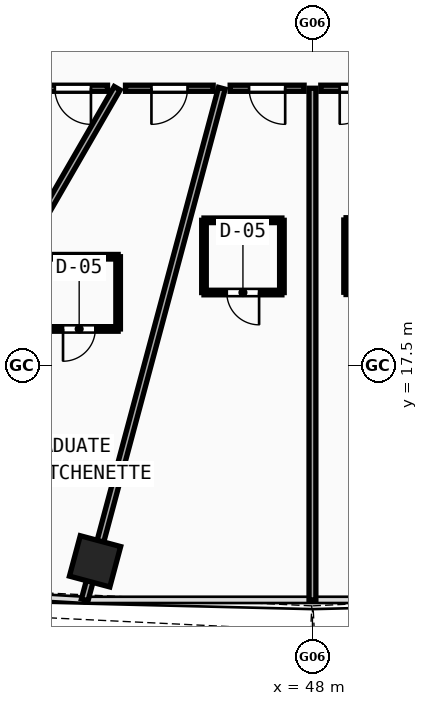
"""IFC4 building model, lengths in metres.
Left out: names, types, materials, properties, quantities, classifications, styles, units other than length and angle.
Written with IfcOpenShell. Run it as: python <this file> out.ifc"""

import sys

from ifc_helpers import new_model, si_unit, direction, frame, frame_2d, origin, origin_with_axes, origin_2d, place, context, subcontext, project, spatial, rectangle, hollow_rectangle, extrude, source, transform, mapped, element, fill, save


model = new_model("IFC4")
c1 = context("Model", 3, precision=1e-05, world=origin(), true_north=direction((0.0, 1.0)))
c2 = subcontext(c1, "Body", "Model", "MODEL_VIEW")
j1 = project(units=[si_unit("LENGTHUNIT", "METRE"), si_unit("PLANEANGLEUNIT", "RADIAN")], contexts=[c1])
p1 = place(None, origin())
s1 = spatial("IfcSite", under=j1, at=p1, CompositionType="ELEMENT")
p2 = place(p1, origin())
s2 = spatial("IfcBuilding", under=s1, at=p2, CompositionType="ELEMENT")
p3 = place(p2, frame((0.0, 0.0, 66.7)))
s3 = spatial("IfcBuildingStorey", under=s2, at=p3, CompositionType="ELEMENT", Elevation=66.7)
m1 = source(origin(), c2, "Body", "SweptSolid", [
    extrude(hollow_rectangle(XDim=1.1, YDim=1.1, WallThickness=0.045, at=origin_2d()), origin(), (0.0, 0.0, 1.0), 3.63),
])
p4 = place(p3, frame((42.28, 12.352, -0.26), z_axis=(0.0, 0.0, 1.0), x_axis=(0.965925826289, -0.258819045103, 0.0)))
e1 = element("IfcColumn", 1, at=p4, inside=s3, PredefinedType="COLUMN", context=c2, shape_type="MappedRepresentation", body=[
    mapped(m1, transform((0.0, 0.0, 0.0), scale=1.0)),
])
p5 = place(p3, frame((42.862, 24.8, 0.0), z_axis=(0.0, 0.0, 1.0), x_axis=(-0.499994448746, -0.866028608779, 0.0)))
e2 = element("IfcWall", 2, at=p5, inside=s3, PredefinedType="PARTITIONING", context=c2, shape_type="SweptSolid", body=[
    extrude(rectangle(XDim=15.099, YDim=0.18, at=frame_2d((7.55, 0.0))), origin(), (0.0, 0.0, 1.0), 2.67),
])
p6 = place(p3, frame((45.615, 24.8, 0.0), z_axis=(0.0, 0.0, 1.0), x_axis=(-0.258819267056, -0.965925766817, 0.0)))
e3 = element("IfcWall", 3, at=p6, inside=s3, PredefinedType="PARTITIONING", context=c2, shape_type="SweptSolid", body=[
    extrude(rectangle(XDim=13.937, YDim=0.18, at=frame_2d((6.969, 0.0))), origin(), (0.0, 0.0, 1.0), 2.67),
])
p7 = place(p3, frame((48.0, 24.8, 0.0), z_axis=(0.0, 0.0, 1.0), x_axis=(0.0, -1.0, 0.0)))
e4 = element("IfcWall", 4, at=p7, inside=s3, PredefinedType="PARTITIONING", context=c2, shape_type="SweptSolid", body=[
    extrude(rectangle(XDim=13.462, YDim=0.18, at=frame_2d((6.731, 0.0))), origin(), (0.0, 0.0, 1.0), 2.67),
])
p8 = place(p3, frame((50.165, 24.8, 0.0), z_axis=(0.0, 0.0, 1.0), x_axis=(-1.0, 0.0, 0.0)))
e5 = element("IfcWall", 5, at=p8, inside=s3, PredefinedType="PARTITIONING", context=c2, shape_type="SweptSolid", body=[
    extrude(rectangle(XDim=1.945, YDim=0.16, at=frame_2d((0.972, 0.0))), origin(), (0.0, 0.0, 1.0), 3.37),
])
p9 = place(p8, frame((0.498, 0.0, 0.0)))
e6 = element("IfcOpeningElement", 6, at=p9, cuts=e5, PredefinedType="OPENING", context=c2, shape_type="SweptSolid", body=[
    extrude(rectangle(XDim=0.95, YDim=2.1, at=frame_2d((0.475, 1.05))), frame((0.0, 0.09, 0.0), z_axis=(0.0, -1.0, 0.0), x_axis=(1.0, 0.0, 0.0)), (0.0, 0.0, 1.0), 0.18),
])
p10 = place(p3, frame((47.78, 24.8, 0.0), z_axis=(0.0, 0.0, 1.0), x_axis=(-1.0, 0.0, 0.0)))
e7 = element("IfcWall", 7, at=p10, inside=s3, PredefinedType="PARTITIONING", context=c2, shape_type="SweptSolid", body=[
    extrude(rectangle(XDim=1.945, YDim=0.16, at=frame_2d((0.972, 0.0))), origin(), (0.0, 0.0, 1.0), 3.37),
])
p11 = place(p10, frame((0.497, 0.0, 0.0)))
e8 = element("IfcOpeningElement", 8, at=p11, cuts=e7, PredefinedType="OPENING", context=c2, shape_type="SweptSolid", body=[
    extrude(rectangle(XDim=0.95, YDim=2.1, at=frame_2d((0.475, 1.05))), frame((0.0, 0.09, 0.0), z_axis=(0.0, -1.0, 0.0), x_axis=(1.0, 0.0, 0.0)), (0.0, 0.0, 1.0), 0.18),
])
p12 = place(p3, frame((45.387, 24.8, 0.0), z_axis=(0.0, 0.0, 1.0), x_axis=(-1.0, 0.0, 0.0)))
e9 = element("IfcWall", 9, at=p12, inside=s3, PredefinedType="PARTITIONING", context=c2, shape_type="SweptSolid", body=[
    extrude(rectangle(XDim=2.306, YDim=0.16, at=frame_2d((1.153, 0.0))), origin(), (0.0, 0.0, 1.0), 3.37),
])
p13 = place(p12, frame((0.674, 0.0, 0.0)))
e10 = element("IfcOpeningElement", 10, at=p13, cuts=e9, PredefinedType="OPENING", context=c2, shape_type="SweptSolid", body=[
    extrude(rectangle(XDim=0.95, YDim=2.1, at=frame_2d((0.475, 1.05))), frame((0.0, 0.09, 0.0), z_axis=(0.0, -1.0, 0.0), x_axis=(1.0, 0.0, 0.0)), (0.0, 0.0, 1.0), 0.18),
])
p14 = place(p3, frame((42.608, 24.8, 0.0), z_axis=(0.0, 0.0, 1.0), x_axis=(-1.0, 0.0, 0.0)))
e11 = element("IfcWall", 11, at=p14, inside=s3, PredefinedType="PARTITIONING", context=c2, shape_type="SweptSolid", body=[
    extrude(rectangle(XDim=1.856, YDim=0.16, at=frame_2d((0.928, 0.0))), origin(), (0.0, 0.0, 1.0), 2.67),
])
p15 = place(p14, frame((0.436, 0.0, 0.0)))
e12 = element("IfcOpeningElement", 12, at=p15, cuts=e11, PredefinedType="OPENING", context=c2, shape_type="SweptSolid", body=[
    extrude(rectangle(XDim=0.95, YDim=2.1, at=frame_2d((0.475, 1.05))), frame((0.0, 0.09, 0.0), z_axis=(0.0, -1.0, 0.0), x_axis=(1.0, 0.0, 0.0)), (0.0, 0.0, 1.0), 0.18),
])
p16 = place(p3, frame((40.837, 18.467, 0.0), z_axis=(0.0, 0.0, 1.0), x_axis=(1.0, 0.0, 0.0)))
e13 = element("IfcWall", 13, at=p16, inside=s3, PredefinedType="PARTITIONING", context=c2, shape_type="SweptSolid", body=[
    extrude(rectangle(XDim=2.05, YDim=0.12, at=frame_2d((1.025, 0.0))), origin(), (0.0, 0.0, 1.0), 3.37),
])
p17 = place(p16, frame((0.6, 0.0, 0.0)))
e14 = element("IfcOpeningElement", 14, at=p17, cuts=e13, PredefinedType="OPENING", context=c2, shape_type="SweptSolid", body=[
    extrude(rectangle(XDim=0.85, YDim=2.1, at=frame_2d((0.425, 1.05))), frame((0.0, 0.07, 0.0), z_axis=(0.0, -1.0, 0.0), x_axis=(1.0, 0.0, 0.0)), (0.0, 0.0, 1.0), 0.14),
])
p18 = place(p3, frame((42.887, 18.467, 0.0), z_axis=(0.0, 0.0, 1.0), x_axis=(0.0, 1.0, 0.0)))
e15 = element("IfcWall", 15, at=p18, inside=s3, PredefinedType="PARTITIONING", context=c2, shape_type="SweptSolid", body=[
    extrude(rectangle(XDim=1.9, YDim=0.12, at=frame_2d((0.95, 0.0))), origin(), (0.0, 0.0, 1.0), 3.37),
])
p19 = place(p3, frame((42.887, 20.367, 0.0), z_axis=(0.0, 0.0, 1.0), x_axis=(-1.0, 0.0, 0.0)))
e16 = element("IfcWall", 16, at=p19, inside=s3, PredefinedType="PARTITIONING", context=c2, shape_type="SweptSolid", body=[
    extrude(rectangle(XDim=2.05, YDim=0.12, at=frame_2d((1.025, 0.0))), origin(), (0.0, 0.0, 1.0), 3.37),
])
p20 = place(p3, frame((45.146, 19.425, 0.0), z_axis=(0.0, 0.0, 1.0), x_axis=(1.0, 0.0, 0.0)))
e17 = element("IfcWall", 17, at=p20, inside=s3, PredefinedType="PARTITIONING", context=c2, shape_type="SweptSolid", body=[
    extrude(rectangle(XDim=2.05, YDim=0.12, at=frame_2d((1.025, 0.0))), origin(), (0.0, 0.0, 1.0), 3.37),
])
p21 = place(p20, frame((0.6, 0.0, 0.0)))
e18 = element("IfcOpeningElement", 18, at=p21, cuts=e17, PredefinedType="OPENING", context=c2, shape_type="SweptSolid", body=[
    extrude(rectangle(XDim=0.85, YDim=2.1, at=frame_2d((0.425, 1.05))), frame((0.0, 0.07, 0.0), z_axis=(0.0, -1.0, 0.0), x_axis=(1.0, 0.0, 0.0)), (0.0, 0.0, 1.0), 0.14),
])
p22 = place(p3, frame((47.196, 19.425, 0.0), z_axis=(0.0, 0.0, 1.0), x_axis=(0.0, 1.0, 0.0)))
e19 = element("IfcWall", 19, at=p22, inside=s3, PredefinedType="PARTITIONING", context=c2, shape_type="SweptSolid", body=[
    extrude(rectangle(XDim=1.9, YDim=0.12, at=frame_2d((0.95, 0.0))), origin(), (0.0, 0.0, 1.0), 3.37),
])
p23 = place(p3, frame((47.196, 21.325, 0.0), z_axis=(0.0, 0.0, 1.0), x_axis=(-1.0, 0.0, 0.0)))
e20 = element("IfcWall", 20, at=p23, inside=s3, PredefinedType="PARTITIONING", context=c2, shape_type="SweptSolid", body=[
    extrude(rectangle(XDim=2.05, YDim=0.12, at=frame_2d((1.025, 0.0))), origin(), (0.0, 0.0, 1.0), 3.37),
])
p24 = place(p3, frame((45.146, 21.325, 0.0), z_axis=(0.0, 0.0, 1.0), x_axis=(0.0, -1.0, 0.0)))
e21 = element("IfcWall", 21, at=p24, inside=s3, PredefinedType="PARTITIONING", context=c2, shape_type="SweptSolid", body=[
    extrude(rectangle(XDim=1.9, YDim=0.12, at=frame_2d((0.95, 0.0))), origin(), (0.0, 0.0, 1.0), 3.37),
])
p25 = place(p3, frame((48.885, 19.433, 0.0), z_axis=(0.0, 0.0, 1.0), x_axis=(1.0, 0.0, 0.0)))
e22 = element("IfcWall", 22, at=p25, inside=s3, PredefinedType="PARTITIONING", context=c2, shape_type="SweptSolid", body=[
    extrude(rectangle(XDim=2.05, YDim=0.12, at=frame_2d((1.025, 0.0))), origin(), (0.0, 0.0, 1.0), 3.37),
])
p26 = place(p25, frame((0.6, 0.0, 0.0)))
e23 = element("IfcOpeningElement", 23, at=p26, cuts=e22, PredefinedType="OPENING", context=c2, shape_type="SweptSolid", body=[
    extrude(rectangle(XDim=0.85, YDim=2.1, at=frame_2d((0.425, 1.05))), frame((0.0, 0.07, 0.0), z_axis=(0.0, -1.0, 0.0), x_axis=(1.0, 0.0, 0.0)), (0.0, 0.0, 1.0), 0.14),
])
p27 = place(p3, frame((50.935, 21.333, 0.0), z_axis=(0.0, 0.0, 1.0), x_axis=(-1.0, 0.0, 0.0)))
e24 = element("IfcWall", 24, at=p27, inside=s3, PredefinedType="PARTITIONING", context=c2, shape_type="SweptSolid", body=[
    extrude(rectangle(XDim=2.05, YDim=0.12, at=frame_2d((1.025, 0.0))), origin(), (0.0, 0.0, 1.0), 3.37),
])
p28 = place(p3, frame((48.885, 21.333, 0.0), z_axis=(0.0, 0.0, 1.0), x_axis=(0.0, -1.0, 0.0)))
e25 = element("IfcWall", 25, at=p28, inside=s3, PredefinedType="PARTITIONING", context=c2, shape_type="SweptSolid", body=[
    extrude(rectangle(XDim=1.9, YDim=0.12, at=frame_2d((0.95, 0.0))), origin(), (0.0, 0.0, 1.0), 3.37),
])
m2 = source(origin(), c2, "Body", "SweptSolid", [
    extrude(rectangle(XDim=0.95, YDim=2.1, at=frame_2d((0.475, 1.05))), frame((0.0, 0.025, 0.0), z_axis=(0.0, -1.0, 0.0), x_axis=(1.0, 0.0, 0.0)), (0.0, 0.0, 1.0), 0.05),
])
p29 = place(p15, origin_with_axes())
e26 = element("IfcDoor", 26, at=p29, inside=s3, OperationType="SINGLE_SWING_LEFT", PredefinedType="DOOR", context=c2, shape_type="MappedRepresentation", body=[
    mapped(m2, transform((0.0, 0.0, 0.0), scale=1.0)),
])
fill(e12, e26)
p30 = place(p13, origin_with_axes())
e27 = element("IfcDoor", 27, at=p30, inside=s3, OperationType="SINGLE_SWING_RIGHT", PredefinedType="DOOR", context=c2, shape_type="MappedRepresentation", body=[
    mapped(m2, transform((0.0, 0.0, 0.0), scale=1.0)),
])
fill(e10, e27)
m3 = source(origin(), c2, "Body", "SweptSolid", [
    extrude(rectangle(XDim=0.85, YDim=2.1, at=frame_2d((0.425, 1.05))), frame((0.0, 0.025, 0.0), z_axis=(0.0, -1.0, 0.0), x_axis=(1.0, 0.0, 0.0)), (0.0, 0.0, 1.0), 0.05),
])
p31 = place(p17, frame((0.85, 0.0, 0.0), z_axis=(0.0, 0.0, 1.0), x_axis=(-1.0, 0.0, 0.0)))
e28 = element("IfcDoor", 28, at=p31, inside=s3, OperationType="SINGLE_SWING_RIGHT", PredefinedType="DOOR", context=c2, shape_type="MappedRepresentation", body=[
    mapped(m3, transform((0.0, 0.0, 0.0), scale=1.0)),
])
fill(e14, e28)
p32 = place(p11, origin_with_axes())
e29 = element("IfcDoor", 29, at=p32, inside=s3, OperationType="SINGLE_SWING_LEFT", PredefinedType="DOOR", context=c2, shape_type="MappedRepresentation", body=[
    mapped(m2, transform((0.0, 0.0, 0.0), scale=1.0)),
])
fill(e8, e29)
p33 = place(p21, frame((0.85, 0.0, 0.0), z_axis=(0.0, 0.0, 1.0), x_axis=(-1.0, 0.0, 0.0)))
e30 = element("IfcDoor", 30, at=p33, inside=s3, OperationType="SINGLE_SWING_LEFT", PredefinedType="DOOR", context=c2, shape_type="MappedRepresentation", body=[
    mapped(m3, transform((0.0, 0.0, 0.0), scale=1.0)),
])
fill(e18, e30)
p34 = place(p9, origin_with_axes())
e31 = element("IfcDoor", 31, at=p34, inside=s3, OperationType="SINGLE_SWING_RIGHT", PredefinedType="DOOR", context=c2, shape_type="MappedRepresentation", body=[
    mapped(m2, transform((0.0, 0.0, 0.0), scale=1.0)),
])
fill(e6, e31)
save(model, sys.argv[1])
